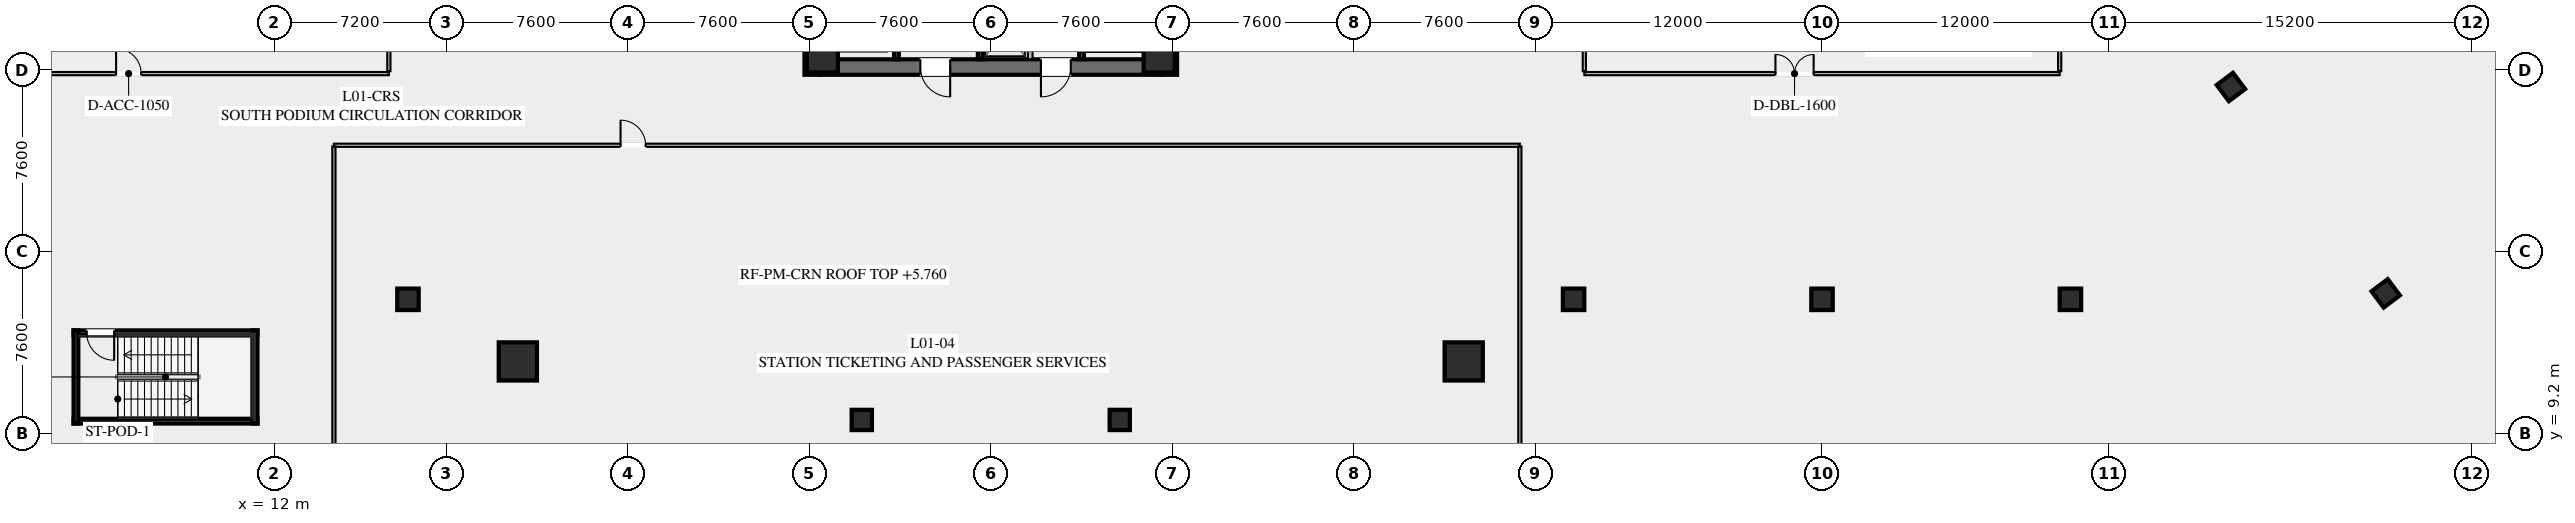
"""IFC4 building model, lengths in metres.
Left out: names, types, materials, properties, quantities, classifications, styles, units other than length and angle.
Written with IfcOpenShell. Run it as: python <this file> out.ifc"""

import sys

from ifc_helpers import new_model, si_unit, direction, frame, frame_2d, origin, origin_2d, place, context, subcontext, project, spatial, rectangle, hollow_rectangle, extrude, element, fill, save


model = new_model("IFC4")
c1 = context("Model", 3, precision=1e-05, world=origin(), true_north=direction((0.0, 1.0)))
c2 = subcontext(c1, "Body", "Model", "MODEL_VIEW")
j1 = project(units=[si_unit("LENGTHUNIT", "METRE"), si_unit("PLANEANGLEUNIT", "RADIAN")], contexts=[c1])
p1 = place(None, origin())
s1 = spatial("IfcSite", under=j1, at=p1, CompositionType="ELEMENT")
p2 = place(p1, origin())
s2 = spatial("IfcBuilding", under=s1, at=p2, CompositionType="ELEMENT")
p3 = place(p2, frame((0.0, 0.0, 5.4)))
s3 = spatial("IfcBuildingStorey", under=s2, at=p3, CompositionType="ELEMENT", Elevation=5.4)
for number, where, z_axis, x_axis in (
    (1, (34.525, 24.2, 0.0), (0.0, 0.0, 1.0), (0.0, 1.0, 0.0)),
    (2, (49.475, 39.8, 0.0), (0.0, 0.0, 1.0), (0.0, -1.0, 0.0)),
):
    element("IfcWall", number, at=place(p3, frame(where, z_axis=z_axis, x_axis=x_axis)), inside=s3, PredefinedType="SHEAR", context=c2, shape_type="SweptSolid", body=[
        extrude(rectangle(XDim=15.6, YDim=0.65, at=frame_2d((7.8, 0.0))), origin(), (0.0, 0.0, 1.0), 4.8),
    ])
p4 = place(p3, frame((49.15, 24.525, 0.0), z_axis=(0.0, 0.0, 1.0), x_axis=(-1.0, 0.0, 0.0)))
e3 = element("IfcWall", 3, at=p4, inside=s3, PredefinedType="SHEAR", context=c2, shape_type="SweptSolid", body=[
    extrude(rectangle(XDim=14.3, YDim=0.65, at=frame_2d((7.15, 0.0))), origin(), (0.0, 0.0, 1.0), 4.8),
])
p5 = place(p4, frame((8.85, 0.0, 0.0)))
e4 = element("IfcOpeningElement", 4, at=p5, cuts=e3, PredefinedType="OPENING", context=c2, shape_type="SweptSolid", body=[
    extrude(rectangle(XDim=1.25, YDim=2.25, at=frame_2d((0.625, 1.125))), frame((0.0, 0.335, 0.0), z_axis=(0.0, -1.0, 0.0), x_axis=(1.0, 0.0, 0.0)), (0.0, 0.0, 1.0), 0.67),
])
p6 = place(p4, frame((3.8, 0.0, 0.0)))
e5 = element("IfcOpeningElement", 5, at=p6, cuts=e3, PredefinedType="OPENING", context=c2, shape_type="SweptSolid", body=[
    extrude(rectangle(XDim=1.25, YDim=2.25, at=frame_2d((0.625, 1.125))), frame((0.0, 0.335, 0.0), z_axis=(0.0, -1.0, 0.0), x_axis=(1.0, 0.0, 0.0)), (0.0, 0.0, 1.0), 0.67),
])
for number, where, z_axis, x_axis in (
    (6, (34.95, 24.95, 0.0), (0.0, 0.0, 1.0), (1.0, 0.0, 0.0)),
    (7, (49.05, 24.95, 0.0), (0.0, 0.0, 1.0), (1.0, 0.0, 0.0)),
):
    element("IfcColumn", number, at=place(p3, frame(where, z_axis=z_axis, x_axis=x_axis)), inside=s3, PredefinedType="COLUMN", context=c2, shape_type="SweptSolid", body=[
        extrude(hollow_rectangle(XDim=1.3, YDim=1.3, WallThickness=0.05, at=origin_2d()), origin(), (0.0, 0.0, 1.0), 4.54),
    ])
for number, where, z_axis, x_axis in (
    (8, (22.2, 12.2, 0.0), (0.0, 0.0, 1.0), (1.0, 0.0, 0.0)),
    (9, (61.8, 12.2, 0.0), (0.0, 0.0, 1.0), (1.0, 0.0, 0.0)),
):
    element("IfcColumn", number, at=place(p3, frame(where, z_axis=z_axis, x_axis=x_axis)), inside=s3, PredefinedType="COLUMN", context=c2, shape_type="SweptSolid", body=[
        extrude(hollow_rectangle(XDim=1.6, YDim=1.6, WallThickness=0.06, at=origin_2d()), origin(), (0.0, 0.0, 1.0), 4.54),
    ])
for number, where, z_axis, x_axis in (
    (10, (36.6, 9.75, 0.0), (0.0, 0.0, 1.0), (1.0, 0.0, 0.0)),
    (11, (47.4, 9.75, 0.0), (0.0, 0.0, 1.0), (1.0, 0.0, 0.0)),
):
    element("IfcColumn", number, at=place(p3, frame(where, z_axis=z_axis, x_axis=x_axis)), inside=s3, PredefinedType="COLUMN", context=c2, shape_type="SweptSolid", body=[
        extrude(hollow_rectangle(XDim=0.85, YDim=0.85, WallThickness=0.035, at=origin_2d()), origin(), (0.0, 0.0, 1.0), 4.54),
    ])
p7 = place(p3, frame((112.476, 21.107, 0.0), z_axis=(0.0, 0.0, 1.0), x_axis=(-0.600005007985, 0.799996243986, 0.0)))
e12 = element("IfcWall", 12, at=p7, inside=s3, PredefinedType="SHEAR", context=c2, shape_type="SweptSolid", body=[
    extrude(rectangle(XDim=15.6, YDim=0.65, at=frame_2d((7.8, 0.0))), origin(), (0.0, 0.0, 1.0), 4.8),
])
for number, where, z_axis, x_axis in (
    (13, (93.92, 23.69, 0.0), (0.0, 0.0, 1.0), (0.8, 0.6, 0.0)),
    (14, (100.4, 15.05, 0.0), (0.0, 0.0, 1.0), (0.8, 0.6, 0.0)),
):
    element("IfcColumn", number, at=place(p3, frame(where, z_axis=z_axis, x_axis=x_axis)), inside=s3, PredefinedType="COLUMN", context=c2, shape_type="SweptSolid", body=[
        extrude(hollow_rectangle(XDim=0.85, YDim=0.85, WallThickness=0.035, at=origin_2d()), origin(), (0.0, 0.0, 1.0), 4.54),
    ])
for number, where, z_axis, x_axis in (
    (15, (17.6, 14.8, 0.0), (0.0, 0.0, 1.0), (1.0, 0.0, 0.0)),
    (16, (66.4, 14.8, 0.0), (0.0, 0.0, 1.0), (1.0, 0.0, 0.0)),
    (17, (76.8, 14.8, 0.0), (0.0, 0.0, 1.0), (1.0, 0.0, 0.0)),
    (18, (87.2, 14.8, 0.0), (0.0, 0.0, 1.0), (1.0, 0.0, 0.0)),
):
    element("IfcColumn", number, at=place(p3, frame(where, z_axis=z_axis, x_axis=x_axis)), inside=s3, PredefinedType="COLUMN", context=c2, shape_type="SweptSolid", body=[
        extrude(rectangle(XDim=0.9, YDim=0.9, at=origin_2d()), origin(), (0.0, 0.0, 1.0), 4.54),
    ])
p8 = place(p3, frame((45.8, 32.8, 0.0), z_axis=(0.0, 0.0, 1.0), x_axis=(0.0, -1.0, 0.0)))
e19 = element("IfcWall", 19, at=p8, inside=s3, PredefinedType="SHEAR", context=c2, shape_type="SweptSolid", body=[
    extrude(rectangle(XDim=7.95, YDim=0.2, at=frame_2d((3.975, 0.0))), origin(), (0.0, 0.0, 1.0), 4.54),
])
p9 = place(p8, frame((0.45, 0.0, 0.0)))
e20 = element("IfcOpeningElement", 20, at=p9, cuts=e19, PredefinedType="OPENING", context=c2, shape_type="SweptSolid", body=[
    extrude(rectangle(XDim=1.15, YDim=2.2, at=frame_2d((0.575, 1.1))), frame((0.0, 0.11, 0.0), z_axis=(0.0, -1.0, 0.0), x_axis=(1.0, 0.0, 0.0)), (0.0, 0.0, 1.0), 0.22),
])
p10 = place(p3, frame((41.56, 24.85, 0.0), z_axis=(0.0, 0.0, 1.0), x_axis=(0.0, 1.0, 0.0)))
e21 = element("IfcWall", 21, at=p10, inside=s3, PredefinedType="SHEAR", context=c2, shape_type="SweptSolid", body=[
    extrude(rectangle(XDim=14.3, YDim=0.2, at=frame_2d((7.15, 0.0))), origin(), (0.0, 0.0, 1.0), 4.54),
])
p11 = place(p3, frame((38.05, 24.85, 0.0), z_axis=(0.0, 0.0, 1.0), x_axis=(0.0, 1.0, 0.0)))
e22 = element("IfcWall", 22, at=p11, inside=s3, PredefinedType="SHEAR", context=c2, shape_type="SweptSolid", body=[
    extrude(rectangle(XDim=6.35, YDim=0.2, at=frame_2d((3.175, 0.0))), origin(), (0.0, 0.0, 1.0), 4.54),
])
p12 = place(p11, frame((4.775, 0.0, 0.0)))
e23 = element("IfcOpeningElement", 23, at=p12, cuts=e22, PredefinedType="OPENING", context=c2, shape_type="SweptSolid", body=[
    extrude(rectangle(XDim=1.3, YDim=2.25, at=frame_2d((0.65, 1.125))), frame((0.0, 0.11, 0.0), z_axis=(0.0, -1.0, 0.0), x_axis=(1.0, 0.0, 0.0)), (0.0, 0.0, 1.0), 0.22),
])
p13 = place(p11, frame((2.775, 0.0, 0.0)))
e24 = element("IfcOpeningElement", 24, at=p13, cuts=e22, PredefinedType="OPENING", context=c2, shape_type="SweptSolid", body=[
    extrude(rectangle(XDim=1.3, YDim=2.25, at=frame_2d((0.65, 1.125))), frame((0.0, 0.11, 0.0), z_axis=(0.0, -1.0, 0.0), x_axis=(1.0, 0.0, 0.0)), (0.0, 0.0, 1.0), 0.22),
])
p14 = place(p11, frame((0.575, 0.0, 0.0)))
e25 = element("IfcOpeningElement", 25, at=p14, cuts=e22, PredefinedType="OPENING", context=c2, shape_type="SweptSolid", body=[
    extrude(rectangle(XDim=1.3, YDim=2.25, at=frame_2d((0.65, 1.125))), frame((0.0, 0.11, 0.0), z_axis=(0.0, -1.0, 0.0), x_axis=(1.0, 0.0, 0.0)), (0.0, 0.0, 1.0), 0.22),
])
p15 = place(p3, frame((43.65, 24.85, 0.0), z_axis=(0.0, 0.0, 1.0), x_axis=(0.0, 1.0, 0.0)))
e26 = element("IfcWall", 26, at=p15, inside=s3, PredefinedType="SOLIDWALL", context=c2, shape_type="SweptSolid", body=[
    extrude(rectangle(XDim=6.8, YDim=0.2, at=frame_2d((3.4, 0.0))), origin(), (0.0, 0.0, 1.0), 4.54),
])
p16 = place(p15, frame((0.625, 0.0, 0.0)))
e27 = element("IfcOpeningElement", 27, at=p16, cuts=e26, PredefinedType="OPENING", context=c2, shape_type="SweptSolid", body=[
    extrude(rectangle(XDim=1.1, YDim=2.2, at=frame_2d((0.55, 1.1))), frame((0.0, 0.11, 0.0), z_axis=(0.0, -1.0, 0.0), x_axis=(1.0, 0.0, 0.0)), (0.0, 0.0, 1.0), 0.22),
])
p17 = place(p15, frame((2.875, 0.0, 0.0)))
e28 = element("IfcOpeningElement", 28, at=p17, cuts=e26, PredefinedType="OPENING", context=c2, shape_type="SweptSolid", body=[
    extrude(rectangle(XDim=1.1, YDim=2.2, at=frame_2d((0.55, 1.1))), frame((0.0, 0.11, 0.0), z_axis=(0.0, -1.0, 0.0), x_axis=(1.0, 0.0, 0.0)), (0.0, 0.0, 1.0), 0.22),
])
p18 = place(p15, frame((5.125, 0.0, 0.0)))
e29 = element("IfcOpeningElement", 29, at=p18, cuts=e26, PredefinedType="OPENING", context=c2, shape_type="SweptSolid", body=[
    extrude(rectangle(XDim=1.1, YDim=2.2, at=frame_2d((0.55, 1.1))), frame((0.0, 0.11, 0.0), z_axis=(0.0, -1.0, 0.0), x_axis=(1.0, 0.0, 0.0)), (0.0, 0.0, 1.0), 0.22),
])
p19 = place(p3, frame((11.3, 13.4, 0.0), z_axis=(0.0, 0.0, 1.0), x_axis=(-1.0, 0.0, 0.0)))
e30 = element("IfcWall", 30, at=p19, inside=s3, PredefinedType="SHEAR", context=c2, shape_type="SweptSolid", body=[
    extrude(rectangle(XDim=7.7, YDim=0.2, at=frame_2d((3.85, 0.0))), origin(), (0.0, 0.0, 1.0), 4.54),
])
p20 = place(p19, frame((6.0, 0.0, 0.0)))
e31 = element("IfcOpeningElement", 31, at=p20, cuts=e30, PredefinedType="OPENING", context=c2, shape_type="SweptSolid", body=[
    extrude(rectangle(XDim=1.15, YDim=2.2, at=frame_2d((0.575, 1.1))), frame((0.0, 0.11, 0.0), z_axis=(0.0, -1.0, 0.0), x_axis=(1.0, 0.0, 0.0)), (0.0, 0.0, 1.0), 0.22),
])
p21 = place(p3, frame((3.6, 9.7, 0.0), z_axis=(0.0, 0.0, 1.0), x_axis=(1.0, 0.0, 0.0)))
e32 = element("IfcWall", 32, at=p21, inside=s3, PredefinedType="SHEAR", context=c2, shape_type="SweptSolid", body=[
    extrude(rectangle(XDim=7.7, YDim=0.2, at=frame_2d((3.85, 0.0))), origin(), (0.0, 0.0, 1.0), 4.54),
])
for number, where, z_axis, x_axis in (
    (33, (3.7, 9.6, 0.0), (0.0, 0.0, 1.0), (0.0, 1.0, 0.0)),
    (34, (11.2, 9.6, 0.0), (0.0, 0.0, 1.0), (0.0, 1.0, 0.0)),
):
    element("IfcWall", number, at=place(p3, frame(where, z_axis=z_axis, x_axis=x_axis)), inside=s3, PredefinedType="SHEAR", context=c2, shape_type="SweptSolid", body=[
        extrude(rectangle(XDim=3.9, YDim=0.2, at=frame_2d((1.95, 0.0))), origin(), (0.0, 0.0, 1.0), 4.54),
    ])
p22 = place(p3, frame((0.18, 24.25, 0.0), z_axis=(0.0, 0.0, 1.0), x_axis=(1.0, 0.0, 0.0)))
e35 = element("IfcWall", 35, at=p22, inside=s3, PredefinedType="PARTITIONING", context=c2, shape_type="SweptSolid", body=[
    extrude(rectangle(XDim=16.62, YDim=0.135, at=frame_2d((8.31, 0.0))), origin(), (0.0, 0.0, 1.0), 3.583),
])
p23 = place(p22, frame((5.2, 0.0, 0.0)))
e36 = element("IfcOpeningElement", 36, at=p23, cuts=e35, PredefinedType="OPENING", context=c2, shape_type="SweptSolid", body=[
    extrude(rectangle(XDim=1.05, YDim=2.2, at=frame_2d((0.525, 1.1))), frame((0.0, 0.077, 0.0), z_axis=(0.0, -1.0, 0.0), x_axis=(1.0, 0.0, 0.0)), (0.0, 0.0, 1.0), 0.155),
])
p24 = place(p3, frame((16.8, 24.35, 0.0), z_axis=(0.0, 0.0, 1.0), x_axis=(0.0, 1.0, 0.0)))
e37 = element("IfcWall", 37, at=p24, inside=s3, PredefinedType="PARTITIONING", context=c2, shape_type="SweptSolid", body=[
    extrude(rectangle(XDim=15.4, YDim=0.135, at=frame_2d((7.7, 0.0))), origin(), (0.0, 0.0, 1.0), 3.583),
])
p25 = place(p3, frame((66.85, 24.25, 0.0), z_axis=(0.0, 0.0, 1.0), x_axis=(1.0, 0.0, 0.0)))
e38 = element("IfcWall", 38, at=p25, inside=s3, PredefinedType="PARTITIONING", context=c2, shape_type="SweptSolid", body=[
    extrude(rectangle(XDim=19.9, YDim=0.135, at=frame_2d((9.95, 0.0))), origin(), (0.0, 0.0, 1.0), 3.583),
])
p26 = place(p25, frame((8.0, 0.0, 0.0)))
e39 = element("IfcOpeningElement", 39, at=p26, cuts=e38, PredefinedType="OPENING", context=c2, shape_type="SweptSolid", body=[
    extrude(rectangle(XDim=1.6, YDim=2.25, at=frame_2d((0.8, 1.125))), frame((0.0, 0.077, 0.0), z_axis=(0.0, -1.0, 0.0), x_axis=(1.0, 0.0, 0.0)), (0.0, 0.0, 1.0), 0.155),
])
for number, where, z_axis, x_axis in (
    (40, (66.85, 24.35, 0.0), (0.0, 0.0, 1.0), (0.0, 1.0, 0.0)),
    (41, (86.75, 24.35, 0.0), (0.0, 0.0, 1.0), (0.0, 1.0, 0.0)),
):
    element("IfcWall", number, at=place(p3, frame(where, z_axis=z_axis, x_axis=x_axis)), inside=s3, PredefinedType="PARTITIONING", context=c2, shape_type="SweptSolid", body=[
        extrude(rectangle(XDim=4.4, YDim=0.135, at=frame_2d((2.2, 0.0))), origin(), (0.0, 0.0, 1.0), 3.583),
    ])
p27 = place(p3, frame((14.5, 21.25, 0.0), z_axis=(0.0, 0.0, 1.0), x_axis=(1.0, 0.0, 0.0)))
e42 = element("IfcWall", 42, at=p27, inside=s3, PredefinedType="PARTITIONING", context=c2, shape_type="SweptSolid", body=[
    extrude(rectangle(XDim=49.65, YDim=0.135, at=frame_2d((24.825, 0.0))), origin(), (0.0, 0.0, 1.0), 3.583),
])
p28 = place(p27, frame((12.0, 0.0, 0.0)))
e43 = element("IfcOpeningElement", 43, at=p28, cuts=e42, PredefinedType="OPENING", context=c2, shape_type="SweptSolid", body=[
    extrude(rectangle(XDim=1.05, YDim=2.2, at=frame_2d((0.525, 1.1))), frame((0.0, 0.077, 0.0), z_axis=(0.0, -1.0, 0.0), x_axis=(1.0, 0.0, 0.0)), (0.0, 0.0, 1.0), 0.155),
])
for number, where, z_axis, x_axis in (
    (44, (14.5, 0.35, 0.0), (0.0, 0.0, 1.0), (0.0, 1.0, 0.0)),
    (45, (64.15, 0.35, 0.0), (0.0, 0.0, 1.0), (0.0, 1.0, 0.0)),
):
    element("IfcWall", number, at=place(p3, frame(where, z_axis=z_axis, x_axis=x_axis)), inside=s3, PredefinedType="PARTITIONING", context=c2, shape_type="SweptSolid", body=[
        extrude(rectangle(XDim=20.85, YDim=0.135, at=frame_2d((10.425, 0.0))), origin(), (0.0, 0.0, 1.0), 3.583),
    ])
p29 = place(p5, origin())
e46 = element("IfcDoor", 46, at=p29, inside=s3, OperationType="SINGLE_SWING_LEFT", PredefinedType="DOOR", context=c2, shape_type="SweptSolid", body=[
    extrude(rectangle(XDim=1.25, YDim=2.25, at=frame_2d((0.625, 1.125))), frame((0.0, 0.025, 0.0), z_axis=(0.0, -1.0, 0.0), x_axis=(1.0, 0.0, 0.0)), (0.0, 0.0, 1.0), 0.05),
])
fill(e4, e46)
p30 = place(p6, origin())
e47 = element("IfcDoor", 47, at=p30, inside=s3, OperationType="SINGLE_SWING_RIGHT", PredefinedType="DOOR", context=c2, shape_type="SweptSolid", body=[
    extrude(rectangle(XDim=1.25, YDim=2.25, at=frame_2d((0.625, 1.125))), frame((0.0, 0.025, 0.0), z_axis=(0.0, -1.0, 0.0), x_axis=(1.0, 0.0, 0.0)), (0.0, 0.0, 1.0), 0.05),
])
fill(e5, e47)
p31 = place(p20, origin())
e48 = element("IfcDoor", 48, at=p31, inside=s3, OperationType="SINGLE_SWING_LEFT", PredefinedType="DOOR", context=c2, shape_type="SweptSolid", body=[
    extrude(rectangle(XDim=1.15, YDim=2.2, at=frame_2d((0.575, 1.1))), frame((0.0, 0.025, 0.0), z_axis=(0.0, -1.0, 0.0), x_axis=(1.0, 0.0, 0.0)), (0.0, 0.0, 1.0), 0.05),
])
fill(e31, e48)
p32 = place(p23, origin())
e49 = element("IfcDoor", 49, at=p32, inside=s3, OperationType="SINGLE_SWING_LEFT", PredefinedType="DOOR", context=c2, shape_type="SweptSolid", body=[
    extrude(rectangle(XDim=1.05, YDim=2.2, at=frame_2d((0.525, 1.1))), frame((0.0, 0.025, 0.0), z_axis=(0.0, -1.0, 0.0), x_axis=(1.0, 0.0, 0.0)), (0.0, 0.0, 1.0), 0.05),
])
fill(e36, e49)
p33 = place(p26, origin())
e50 = element("IfcDoor", 50, at=p33, inside=s3, OperationType="DOUBLE_DOOR_SINGLE_SWING", PredefinedType="DOOR", context=c2, shape_type="SweptSolid", body=[
    extrude(rectangle(XDim=1.6, YDim=2.25, at=frame_2d((0.8, 1.125))), frame((0.0, 0.025, 0.0), z_axis=(0.0, -1.0, 0.0), x_axis=(1.0, 0.0, 0.0)), (0.0, 0.0, 1.0), 0.05),
])
fill(e39, e50)
p34 = place(p28, origin())
e51 = element("IfcDoor", 51, at=p34, inside=s3, OperationType="SINGLE_SWING_LEFT", PredefinedType="DOOR", context=c2, shape_type="SweptSolid", body=[
    extrude(rectangle(XDim=1.05, YDim=2.2, at=frame_2d((0.525, 1.1))), frame((0.0, 0.025, 0.0), z_axis=(0.0, -1.0, 0.0), x_axis=(1.0, 0.0, 0.0)), (0.0, 0.0, 1.0), 0.05),
])
fill(e43, e51)
save(model, sys.argv[1])
